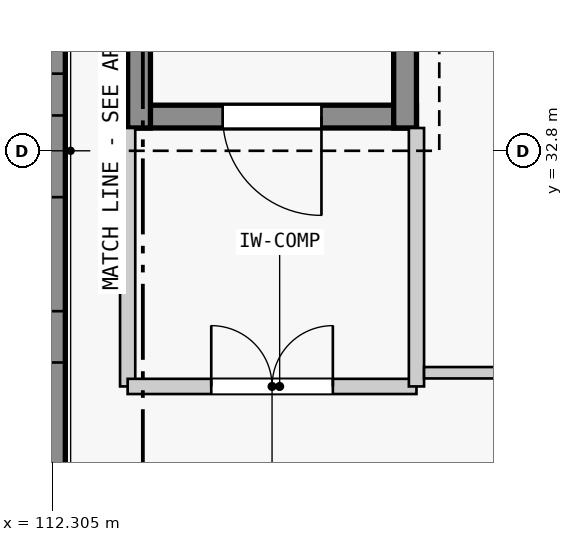
"""IFC4 building model, lengths in metres.
Left out: names, types, materials, properties, quantities, classifications, styles, units other than length and angle.
Written with IfcOpenShell. Run it as: python <this file> out.ifc"""

import sys

from ifc_helpers import new_model, si_unit, direction, frame, frame_2d, origin, place, context, subcontext, project, spatial, rectangle, extrude, element, fill, save


model = new_model("IFC4")
c1 = context("Model", 3, precision=1e-05, world=origin(), true_north=direction((0.0, 1.0)))
c2 = subcontext(c1, "Body", "Model", "MODEL_VIEW")
j1 = project(units=[si_unit("LENGTHUNIT", "METRE"), si_unit("PLANEANGLEUNIT", "RADIAN")], contexts=[c1])
p1 = place(None, origin())
s1 = spatial("IfcSite", under=j1, at=p1, CompositionType="ELEMENT")
p2 = place(p1, origin())
s2 = spatial("IfcBuilding", under=s1, at=p2, CompositionType="ELEMENT")
p3 = place(p2, frame((0.0, 0.0, 5.4)))
s3 = spatial("IfcBuildingStorey", under=s2, at=p3, CompositionType="ELEMENT", Elevation=5.4)
p4 = place(p3, frame((112.29, 4.19, 0.0), z_axis=(0.0, 0.0, 1.0), x_axis=(0.0, 1.0, 0.0)))
e1 = element("IfcWall", 1, at=p4, inside=s3, PredefinedType="STANDARD", context=c2, shape_type="SweptSolid", body=[
    extrude(rectangle(XDim=37.92, YDim=0.38, at=frame_2d((18.96, 0.0))), origin(), (0.0, 0.0, 1.0), 3.94),
])
p5 = place(p4, frame((1.45, 0.0, 0.95)))
e2 = element("IfcOpeningElement", 2, at=p5, cuts=e1, PredefinedType="OPENING", context=c2, shape_type="SweptSolid", body=[
    extrude(rectangle(XDim=1.2, YDim=2.4, at=frame_2d((0.6, 1.2))), frame((0.0, 0.2, 0.0), z_axis=(0.0, -1.0, 0.0), x_axis=(1.0, 0.0, 0.0)), (0.0, 0.0, 1.0), 0.4),
])
p6 = place(p4, frame((3.475, 0.0, 0.95)))
e3 = element("IfcOpeningElement", 3, at=p6, cuts=e1, PredefinedType="OPENING", context=c2, shape_type="SweptSolid", body=[
    extrude(rectangle(XDim=1.35, YDim=2.5, at=frame_2d((0.675, 1.25))), frame((0.0, 0.2, 0.0), z_axis=(0.0, -1.0, 0.0), x_axis=(1.0, 0.0, 0.0)), (0.0, 0.0, 1.0), 0.4),
])
p7 = place(p4, frame((5.5, 0.0, 0.95)))
e4 = element("IfcOpeningElement", 4, at=p7, cuts=e1, PredefinedType="OPENING", context=c2, shape_type="SweptSolid", body=[
    extrude(rectangle(XDim=1.5, YDim=2.2, at=frame_2d((0.75, 1.1))), frame((0.0, 0.2, 0.0), z_axis=(0.0, -1.0, 0.0), x_axis=(1.0, 0.0, 0.0)), (0.0, 0.0, 1.0), 0.4),
])
p8 = place(p4, frame((8.075, 0.0, 0.95)))
e5 = element("IfcOpeningElement", 5, at=p8, cuts=e1, PredefinedType="OPENING", context=c2, shape_type="SweptSolid", body=[
    extrude(rectangle(XDim=0.55, YDim=2.1, at=frame_2d((0.275, 1.05))), frame((0.0, 0.2, 0.0), z_axis=(0.0, -1.0, 0.0), x_axis=(1.0, 0.0, 0.0)), (0.0, 0.0, 1.0), 0.4),
])
p9 = place(p4, frame((10.15, 0.0, 0.95)))
e6 = element("IfcOpeningElement", 6, at=p9, cuts=e1, PredefinedType="OPENING", context=c2, shape_type="SweptSolid", body=[
    extrude(rectangle(XDim=0.6, YDim=2.2, at=frame_2d((0.3, 1.1))), frame((0.0, 0.2, 0.0), z_axis=(0.0, -1.0, 0.0), x_axis=(1.0, 0.0, 0.0)), (0.0, 0.0, 1.0), 0.4),
])
p10 = place(p4, frame((12.225, 0.0, 0.95)))
e7 = element("IfcOpeningElement", 7, at=p10, cuts=e1, PredefinedType="OPENING", context=c2, shape_type="SweptSolid", body=[
    extrude(rectangle(XDim=0.65, YDim=2.4, at=frame_2d((0.325, 1.2))), frame((0.0, 0.2, 0.0), z_axis=(0.0, -1.0, 0.0), x_axis=(1.0, 0.0, 0.0)), (0.0, 0.0, 1.0), 0.4),
])
p11 = place(p4, frame((14.275, 0.0, 0.95)))
e8 = element("IfcOpeningElement", 8, at=p11, cuts=e1, PredefinedType="OPENING", context=c2, shape_type="SweptSolid", body=[
    extrude(rectangle(XDim=0.75, YDim=2.3, at=frame_2d((0.375, 1.15))), frame((0.0, 0.2, 0.0), z_axis=(0.0, -1.0, 0.0), x_axis=(1.0, 0.0, 0.0)), (0.0, 0.0, 1.0), 0.4),
])
p12 = place(p4, frame((16.3, 0.0, 0.95)))
e9 = element("IfcOpeningElement", 9, at=p12, cuts=e1, PredefinedType="OPENING", context=c2, shape_type="SweptSolid", body=[
    extrude(rectangle(XDim=0.9, YDim=2.2, at=frame_2d((0.45, 1.1))), frame((0.0, 0.2, 0.0), z_axis=(0.0, -1.0, 0.0), x_axis=(1.0, 0.0, 0.0)), (0.0, 0.0, 1.0), 0.4),
])
p13 = place(p4, frame((20.35, 0.0, 0.95)))
e10 = element("IfcOpeningElement", 10, at=p13, cuts=e1, PredefinedType="OPENING", context=c2, shape_type="SweptSolid", body=[
    extrude(rectangle(XDim=1.2, YDim=1.8, at=frame_2d((0.6, 0.9))), frame((0.0, 0.2, 0.0), z_axis=(0.0, -1.0, 0.0), x_axis=(1.0, 0.0, 0.0)), (0.0, 0.0, 1.0), 0.4),
])
p14 = place(p4, frame((22.45, 0.0, 0.95)))
e11 = element("IfcOpeningElement", 11, at=p14, cuts=e1, PredefinedType="OPENING", context=c2, shape_type="SweptSolid", body=[
    extrude(rectangle(XDim=1.2, YDim=2.4, at=frame_2d((0.6, 1.2))), frame((0.0, 0.2, 0.0), z_axis=(0.0, -1.0, 0.0), x_axis=(1.0, 0.0, 0.0)), (0.0, 0.0, 1.0), 0.4),
])
p15 = place(p4, frame((24.475, 0.0, 0.95)))
e12 = element("IfcOpeningElement", 12, at=p15, cuts=e1, PredefinedType="OPENING", context=c2, shape_type="SweptSolid", body=[
    extrude(rectangle(XDim=1.35, YDim=2.5, at=frame_2d((0.675, 1.25))), frame((0.0, 0.2, 0.0), z_axis=(0.0, -1.0, 0.0), x_axis=(1.0, 0.0, 0.0)), (0.0, 0.0, 1.0), 0.4),
])
p16 = place(p4, frame((26.5, 0.0, 0.95)))
e13 = element("IfcOpeningElement", 13, at=p16, cuts=e1, PredefinedType="OPENING", context=c2, shape_type="SweptSolid", body=[
    extrude(rectangle(XDim=1.5, YDim=2.2, at=frame_2d((0.75, 1.1))), frame((0.0, 0.2, 0.0), z_axis=(0.0, -1.0, 0.0), x_axis=(1.0, 0.0, 0.0)), (0.0, 0.0, 1.0), 0.4),
])
p17 = place(p4, frame((29.075, 0.0, 0.95)))
e14 = element("IfcOpeningElement", 14, at=p17, cuts=e1, PredefinedType="OPENING", context=c2, shape_type="SweptSolid", body=[
    extrude(rectangle(XDim=0.55, YDim=2.1, at=frame_2d((0.275, 1.05))), frame((0.0, 0.2, 0.0), z_axis=(0.0, -1.0, 0.0), x_axis=(1.0, 0.0, 0.0)), (0.0, 0.0, 1.0), 0.4),
])
p18 = place(p4, frame((31.15, 0.0, 0.95)))
e15 = element("IfcOpeningElement", 15, at=p18, cuts=e1, PredefinedType="OPENING", context=c2, shape_type="SweptSolid", body=[
    extrude(rectangle(XDim=0.6, YDim=2.2, at=frame_2d((0.3, 1.1))), frame((0.0, 0.2, 0.0), z_axis=(0.0, -1.0, 0.0), x_axis=(1.0, 0.0, 0.0)), (0.0, 0.0, 1.0), 0.4),
])
p19 = place(p4, frame((33.225, 0.0, 0.95)))
e16 = element("IfcOpeningElement", 16, at=p19, cuts=e1, PredefinedType="OPENING", context=c2, shape_type="SweptSolid", body=[
    extrude(rectangle(XDim=0.65, YDim=2.4, at=frame_2d((0.325, 1.2))), frame((0.0, 0.2, 0.0), z_axis=(0.0, -1.0, 0.0), x_axis=(1.0, 0.0, 0.0)), (0.0, 0.0, 1.0), 0.4),
])
p20 = place(p4, frame((35.275, 0.0, 0.95)))
e17 = element("IfcOpeningElement", 17, at=p20, cuts=e1, PredefinedType="OPENING", context=c2, shape_type="SweptSolid", body=[
    extrude(rectangle(XDim=0.75, YDim=2.3, at=frame_2d((0.375, 1.15))), frame((0.0, 0.2, 0.0), z_axis=(0.0, -1.0, 0.0), x_axis=(1.0, 0.0, 0.0)), (0.0, 0.0, 1.0), 0.4),
])
p21 = place(p3, frame((117.1, 33.25, 0.0), z_axis=(0.0, 0.0, 1.0), x_axis=(-1.0, 0.0, 0.0)))
e18 = element("IfcWall", 18, at=p21, inside=s3, PredefinedType="SHEAR", context=c2, shape_type="SweptSolid", body=[
    extrude(rectangle(XDim=3.8, YDim=0.3, at=frame_2d((1.9, 0.0))), origin(), (0.0, 0.0, 1.0), 4.2),
])
p22 = place(p21, frame((1.25, 0.0, 0.0)))
e19 = element("IfcOpeningElement", 19, at=p22, cuts=e18, PredefinedType="OPENING", context=c2, shape_type="SweptSolid", body=[
    extrude(rectangle(XDim=1.3, YDim=2.2, at=frame_2d((0.65, 1.1))), frame((0.0, 0.16, 0.0), z_axis=(0.0, -1.0, 0.0), x_axis=(1.0, 0.0, 0.0)), (0.0, 0.0, 1.0), 0.32),
])
for number, where, z_axis, x_axis in (
    (20, (113.45, 33.1, 0.0), (0.0, 0.0, 1.0), (0.0, 1.0, 0.0)),
    (21, (116.95, 41.2, 0.0), (0.0, 0.0, 1.0), (0.0, -1.0, 0.0)),
):
    element("IfcWall", number, at=place(p3, frame(where, z_axis=z_axis, x_axis=x_axis)), inside=s3, PredefinedType="SHEAR", context=c2, shape_type="SweptSolid", body=[
        extrude(rectangle(XDim=8.1, YDim=0.3, at=frame_2d((4.05, 0.0))), origin(), (0.0, 0.0, 1.0), 4.2),
    ])
p23 = place(p3, frame((113.3, 33.1, 0.0), z_axis=(0.0, 0.0, 1.0), x_axis=(0.0, -1.0, 0.0)))
e22 = element("IfcWall", 22, at=p23, inside=s3, PredefinedType="STANDARD", context=c2, shape_type="SweptSolid", body=[
    extrude(rectangle(XDim=3.4, YDim=0.2, at=frame_2d((1.7, 0.0))), origin(), (0.0, 0.0, 1.0), 4.2),
])
p24 = place(p3, frame((113.3, 29.7, 0.0), z_axis=(0.0, 0.0, 1.0), x_axis=(1.0, 0.0, 0.0)))
e23 = element("IfcWall", 23, at=p24, inside=s3, PredefinedType="STANDARD", context=c2, shape_type="SweptSolid", body=[
    extrude(rectangle(XDim=3.8, YDim=0.2, at=frame_2d((1.9, 0.0))), origin(), (0.0, 0.0, 1.0), 4.2),
])
p25 = place(p24, frame((1.1, 0.0, 0.0)))
e24 = element("IfcOpeningElement", 24, at=p25, cuts=e23, PredefinedType="OPENING", context=c2, shape_type="SweptSolid", body=[
    extrude(rectangle(XDim=1.6, YDim=2.2, at=frame_2d((0.8, 1.1))), frame((0.0, 0.11, 0.0), z_axis=(0.0, -1.0, 0.0), x_axis=(1.0, 0.0, 0.0)), (0.0, 0.0, 1.0), 0.22),
])
p26 = place(p3, frame((117.1, 29.7, 0.0), z_axis=(0.0, 0.0, 1.0), x_axis=(0.0, 1.0, 0.0)))
e25 = element("IfcWall", 25, at=p26, inside=s3, PredefinedType="STANDARD", context=c2, shape_type="SweptSolid", body=[
    extrude(rectangle(XDim=3.4, YDim=0.2, at=frame_2d((1.7, 0.0))), origin(), (0.0, 0.0, 1.0), 4.2),
])
p27 = place(p3, frame((122.12, 29.88, 0.0), z_axis=(0.0, 0.0, 1.0), x_axis=(-1.0, 0.0, 0.0)))
e26 = element("IfcWall", 26, at=p27, inside=s3, PredefinedType="PARTITIONING", context=c2, shape_type="SweptSolid", body=[
    extrude(rectangle(XDim=4.92, YDim=0.15, at=frame_2d((2.46, 0.0))), origin(), (0.0, 0.0, 1.0), 3.08),
])
p28 = place(p15, origin())
e27 = element("IfcWindow", 27, at=p28, inside=s3, PartitioningType="SINGLE_PANEL", PredefinedType="WINDOW", context=c2, shape_type="SweptSolid", body=[
    extrude(rectangle(XDim=1.35, YDim=2.5, at=frame_2d((0.675, 1.25))), frame((0.0, 0.03, 0.0), z_axis=(0.0, -1.0, 0.0), x_axis=(1.0, 0.0, 0.0)), (0.0, 0.0, 1.0), 0.06),
])
fill(e12, e27)
p29 = place(p16, origin())
e28 = element("IfcWindow", 28, at=p29, inside=s3, PartitioningType="SINGLE_PANEL", PredefinedType="WINDOW", context=c2, shape_type="SweptSolid", body=[
    extrude(rectangle(XDim=1.5, YDim=2.2, at=frame_2d((0.75, 1.1))), frame((0.0, 0.03, 0.0), z_axis=(0.0, -1.0, 0.0), x_axis=(1.0, 0.0, 0.0)), (0.0, 0.0, 1.0), 0.06),
])
fill(e13, e28)
p30 = place(p17, origin())
e29 = element("IfcWindow", 29, at=p30, inside=s3, PartitioningType="SINGLE_PANEL", PredefinedType="WINDOW", context=c2, shape_type="SweptSolid", body=[
    extrude(rectangle(XDim=0.55, YDim=2.1, at=frame_2d((0.275, 1.05))), frame((0.0, 0.03, 0.0), z_axis=(0.0, -1.0, 0.0), x_axis=(1.0, 0.0, 0.0)), (0.0, 0.0, 1.0), 0.06),
])
fill(e14, e29)
p31 = place(p22, origin())
e30 = element("IfcDoor", 30, at=p31, inside=s3, OperationType="SINGLE_SWING_LEFT", PredefinedType="DOOR", context=c2, shape_type="SweptSolid", body=[
    extrude(rectangle(XDim=1.3, YDim=2.2, at=frame_2d((0.65, 1.1))), frame((0.0, 0.025, 0.0), z_axis=(0.0, -1.0, 0.0), x_axis=(1.0, 0.0, 0.0)), (0.0, 0.0, 1.0), 0.05),
])
fill(e19, e30)
p32 = place(p25, origin())
e31 = element("IfcDoor", 31, at=p32, inside=s3, OperationType="DOUBLE_DOOR_SINGLE_SWING", PredefinedType="DOOR", context=c2, shape_type="SweptSolid", body=[
    extrude(rectangle(XDim=1.6, YDim=2.2, at=frame_2d((0.8, 1.1))), frame((0.0, 0.025, 0.0), z_axis=(0.0, -1.0, 0.0), x_axis=(1.0, 0.0, 0.0)), (0.0, 0.0, 1.0), 0.05),
])
fill(e24, e31)
save(model, sys.argv[1])
